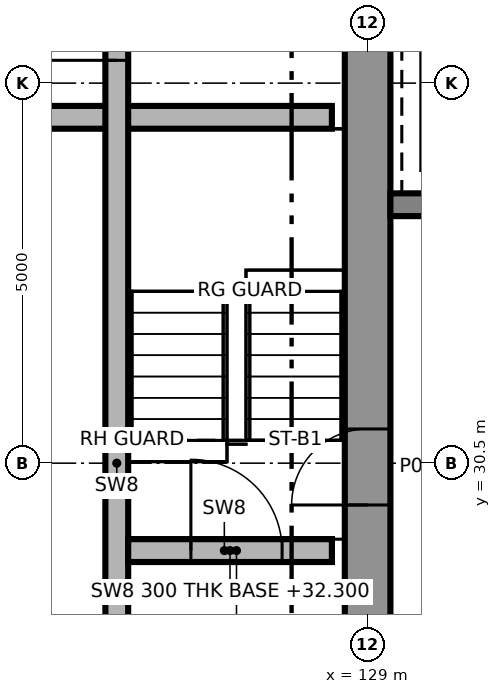
"""IFC4 building model, lengths in metres.
Left out: names, types, materials, properties, quantities, classifications, styles, units other than length and angle.
Written with IfcOpenShell. Run it as: python <this file> out.ifc"""

import sys

from ifc_helpers import new_model, si_unit, direction, frame, frame_2d, origin, place, context, subcontext, project, spatial, rectangle, extrude, element, fill, save


model = new_model("IFC4")
c1 = context("Model", 3, precision=1e-05, world=origin(), true_north=direction((0.0, 1.0)))
c2 = subcontext(c1, "Body", "Model", "MODEL_VIEW")
j1 = project(units=[si_unit("LENGTHUNIT", "METRE"), si_unit("PLANEANGLEUNIT", "RADIAN")], contexts=[c1])
p1 = place(None, origin())
s1 = spatial("IfcSite", under=j1, at=p1, CompositionType="ELEMENT")
p2 = place(p1, origin())
s2 = spatial("IfcBuilding", under=s1, at=p2, CompositionType="ELEMENT")
p3 = place(p2, frame((0.0, 0.0, 28.5)))
s3 = spatial("IfcBuildingStorey", under=s2, at=p3, CompositionType="ELEMENT", Elevation=28.5)
p4 = place(p3, frame((129.0, 24.8, 0.0), z_axis=(0.0, 0.0, 1.0), x_axis=(0.0, 1.0, 0.0)))
e1 = element("IfcWall", 1, at=p4, inside=s3, PredefinedType="SHEAR", context=c2, shape_type="SweptSolid", body=[
    extrude(rectangle(XDim=12.4, YDim=0.6, at=frame_2d((6.2, 0.0))), origin(), (0.0, 0.0, 1.0), 5.0),
])
p5 = place(p4, frame((5.15, 0.0, 0.0)))
e2 = element("IfcOpeningElement", 2, at=p5, cuts=e1, PredefinedType="OPENING", context=c2, shape_type="SweptSolid", body=[
    extrude(rectangle(XDim=1.0, YDim=2.1, at=frame_2d((0.5, 1.05))), frame((0.0, 0.31, 0.0), z_axis=(0.0, -1.0, 0.0), x_axis=(1.0, 0.0, 0.0)), (0.0, 0.0, 1.0), 0.62),
])
p6 = place(p3, frame((129.3, 33.9, 0.0), z_axis=(0.0, 0.0, 1.0), x_axis=(1.0, 0.0, 0.0)))
e3 = element("IfcWall", 3, at=p6, inside=s3, PredefinedType="SHEAR", context=c2, shape_type="SweptSolid", body=[
    extrude(rectangle(XDim=2.65, YDim=0.3, at=frame_2d((1.325, 0.0))), origin(), (0.0, 0.0, 1.0), 5.0),
])
p7 = place(p6, frame((1.05, 0.0, 0.0)))
e4 = element("IfcOpeningElement", 4, at=p7, cuts=e3, PredefinedType="OPENING", context=c2, shape_type="SweptSolid", body=[
    extrude(rectangle(XDim=1.3, YDim=2.4, at=frame_2d((0.65, 1.2))), frame((0.0, 0.16, 0.0), z_axis=(0.0, -1.0, 0.0), x_axis=(1.0, 0.0, 0.0)), (0.0, 0.0, 1.0), 0.32),
])
p8 = place(p3, frame((125.7, 29.35, 0.0), z_axis=(0.0, 0.0, 1.0), x_axis=(1.0, 0.0, 0.0)))
e5 = element("IfcWall", 5, at=p8, inside=s3, PredefinedType="SHEAR", context=c2, shape_type="SweptSolid", body=[
    extrude(rectangle(XDim=2.83, YDim=0.3, at=frame_2d((1.415, 0.0))), origin(), (0.0, 0.0, 1.0), 3.8),
])
p9 = place(p8, frame((0.975, 0.0, 0.0)))
e6 = element("IfcOpeningElement", 6, at=p9, cuts=e5, PredefinedType="OPENING", context=c2, shape_type="SweptSolid", body=[
    extrude(rectangle(XDim=1.2, YDim=2.1, at=frame_2d((0.6, 1.05))), frame((0.0, 0.16, 0.0), z_axis=(0.0, -1.0, 0.0), x_axis=(1.0, 0.0, 0.0)), (0.0, 0.0, 1.0), 0.32),
])
p10 = place(p3, frame((114.6, 35.05, 0.0), z_axis=(0.0, 0.0, 1.0), x_axis=(1.0, 0.0, 0.0)))
e7 = element("IfcWall", 7, at=p10, inside=s3, PredefinedType="SHEAR", context=c2, shape_type="SweptSolid", body=[
    extrude(rectangle(XDim=13.93, YDim=0.3, at=frame_2d((6.965, 0.0))), origin(), (0.0, 0.0, 1.0), 4.65),
])
p11 = place(p10, frame((5.13, 0.0, 0.0)))
e8 = element("IfcOpeningElement", 8, at=p11, cuts=e7, PredefinedType="OPENING", context=c2, shape_type="SweptSolid", body=[
    extrude(rectangle(XDim=1.0, YDim=2.1, at=frame_2d((0.5, 1.05))), frame((0.0, 0.16, 0.0), z_axis=(0.0, -1.0, 0.0), x_axis=(1.0, 0.0, 0.0)), (0.0, 0.0, 1.0), 0.32),
])
p12 = place(p3, frame((125.7, 11.07, 0.0), z_axis=(0.0, 0.0, 1.0), x_axis=(0.0, 1.0, 0.0)))
e9 = element("IfcWall", 9, at=p12, inside=s3, PredefinedType="SHEAR", context=c2, shape_type="SweptSolid", body=[
    extrude(rectangle(XDim=38.86, YDim=0.3, at=frame_2d((19.43, 0.0))), origin(), (0.0, 0.0, 1.0), 4.65),
])
p13 = place(p12, frame((24.73, 0.0, 0.0)))
e10 = element("IfcOpeningElement", 10, at=p13, cuts=e9, PredefinedType="OPENING", context=c2, shape_type="SweptSolid", body=[
    extrude(rectangle(XDim=1.2, YDim=2.1, at=frame_2d((0.6, 1.05))), frame((0.0, 0.16, 0.0), z_axis=(0.0, -1.0, 0.0), x_axis=(1.0, 0.0, 0.0)), (0.0, 0.0, 1.0), 0.32),
])
p14 = place(p3, frame((125.85, 29.35, 3.8), z_axis=(0.0, 0.0, 1.0), x_axis=(1.0, 0.0, 0.0)))
e11 = element("IfcWall", 11, at=p14, inside=s3, PredefinedType="SHEAR", context=c2, shape_type="SweptSolid", body=[
    extrude(rectangle(XDim=2.68, YDim=0.3, at=frame_2d((1.34, 0.0))), origin(), (0.0, 0.0, 1.0), 0.9),
])
p15 = place(p9, origin())
e12 = element("IfcDoor", 12, at=p15, inside=s3, OperationType="SINGLE_SWING_LEFT", PredefinedType="DOOR", context=c2, shape_type="SweptSolid", body=[
    extrude(rectangle(XDim=1.2, YDim=2.1, at=frame_2d((0.6, 1.05))), frame((0.0, 0.025, 0.0), z_axis=(0.0, -1.0, 0.0), x_axis=(1.0, 0.0, 0.0)), (0.0, 0.0, 1.0), 0.05),
])
fill(e6, e12)
p16 = place(p13, origin())
e13 = element("IfcDoor", 13, at=p16, inside=s3, OperationType="SINGLE_SWING_LEFT", PredefinedType="DOOR", context=c2, shape_type="SweptSolid", body=[
    extrude(rectangle(XDim=1.2, YDim=2.1, at=frame_2d((0.6, 1.05))), frame((0.0, 0.025, 0.0), z_axis=(0.0, -1.0, 0.0), x_axis=(1.0, 0.0, 0.0)), (0.0, 0.0, 1.0), 0.05),
])
fill(e10, e13)
p17 = place(p5, origin())
e14 = element("IfcDoor", 14, at=p17, inside=s3, OperationType="SINGLE_SWING_RIGHT", PredefinedType="DOOR", context=c2, shape_type="SweptSolid", body=[
    extrude(rectangle(XDim=1.0, YDim=2.1, at=frame_2d((0.5, 1.05))), frame((0.0, 0.025, 0.0), z_axis=(0.0, -1.0, 0.0), x_axis=(1.0, 0.0, 0.0)), (0.0, 0.0, 1.0), 0.05),
])
fill(e2, e14)
save(model, sys.argv[1])
